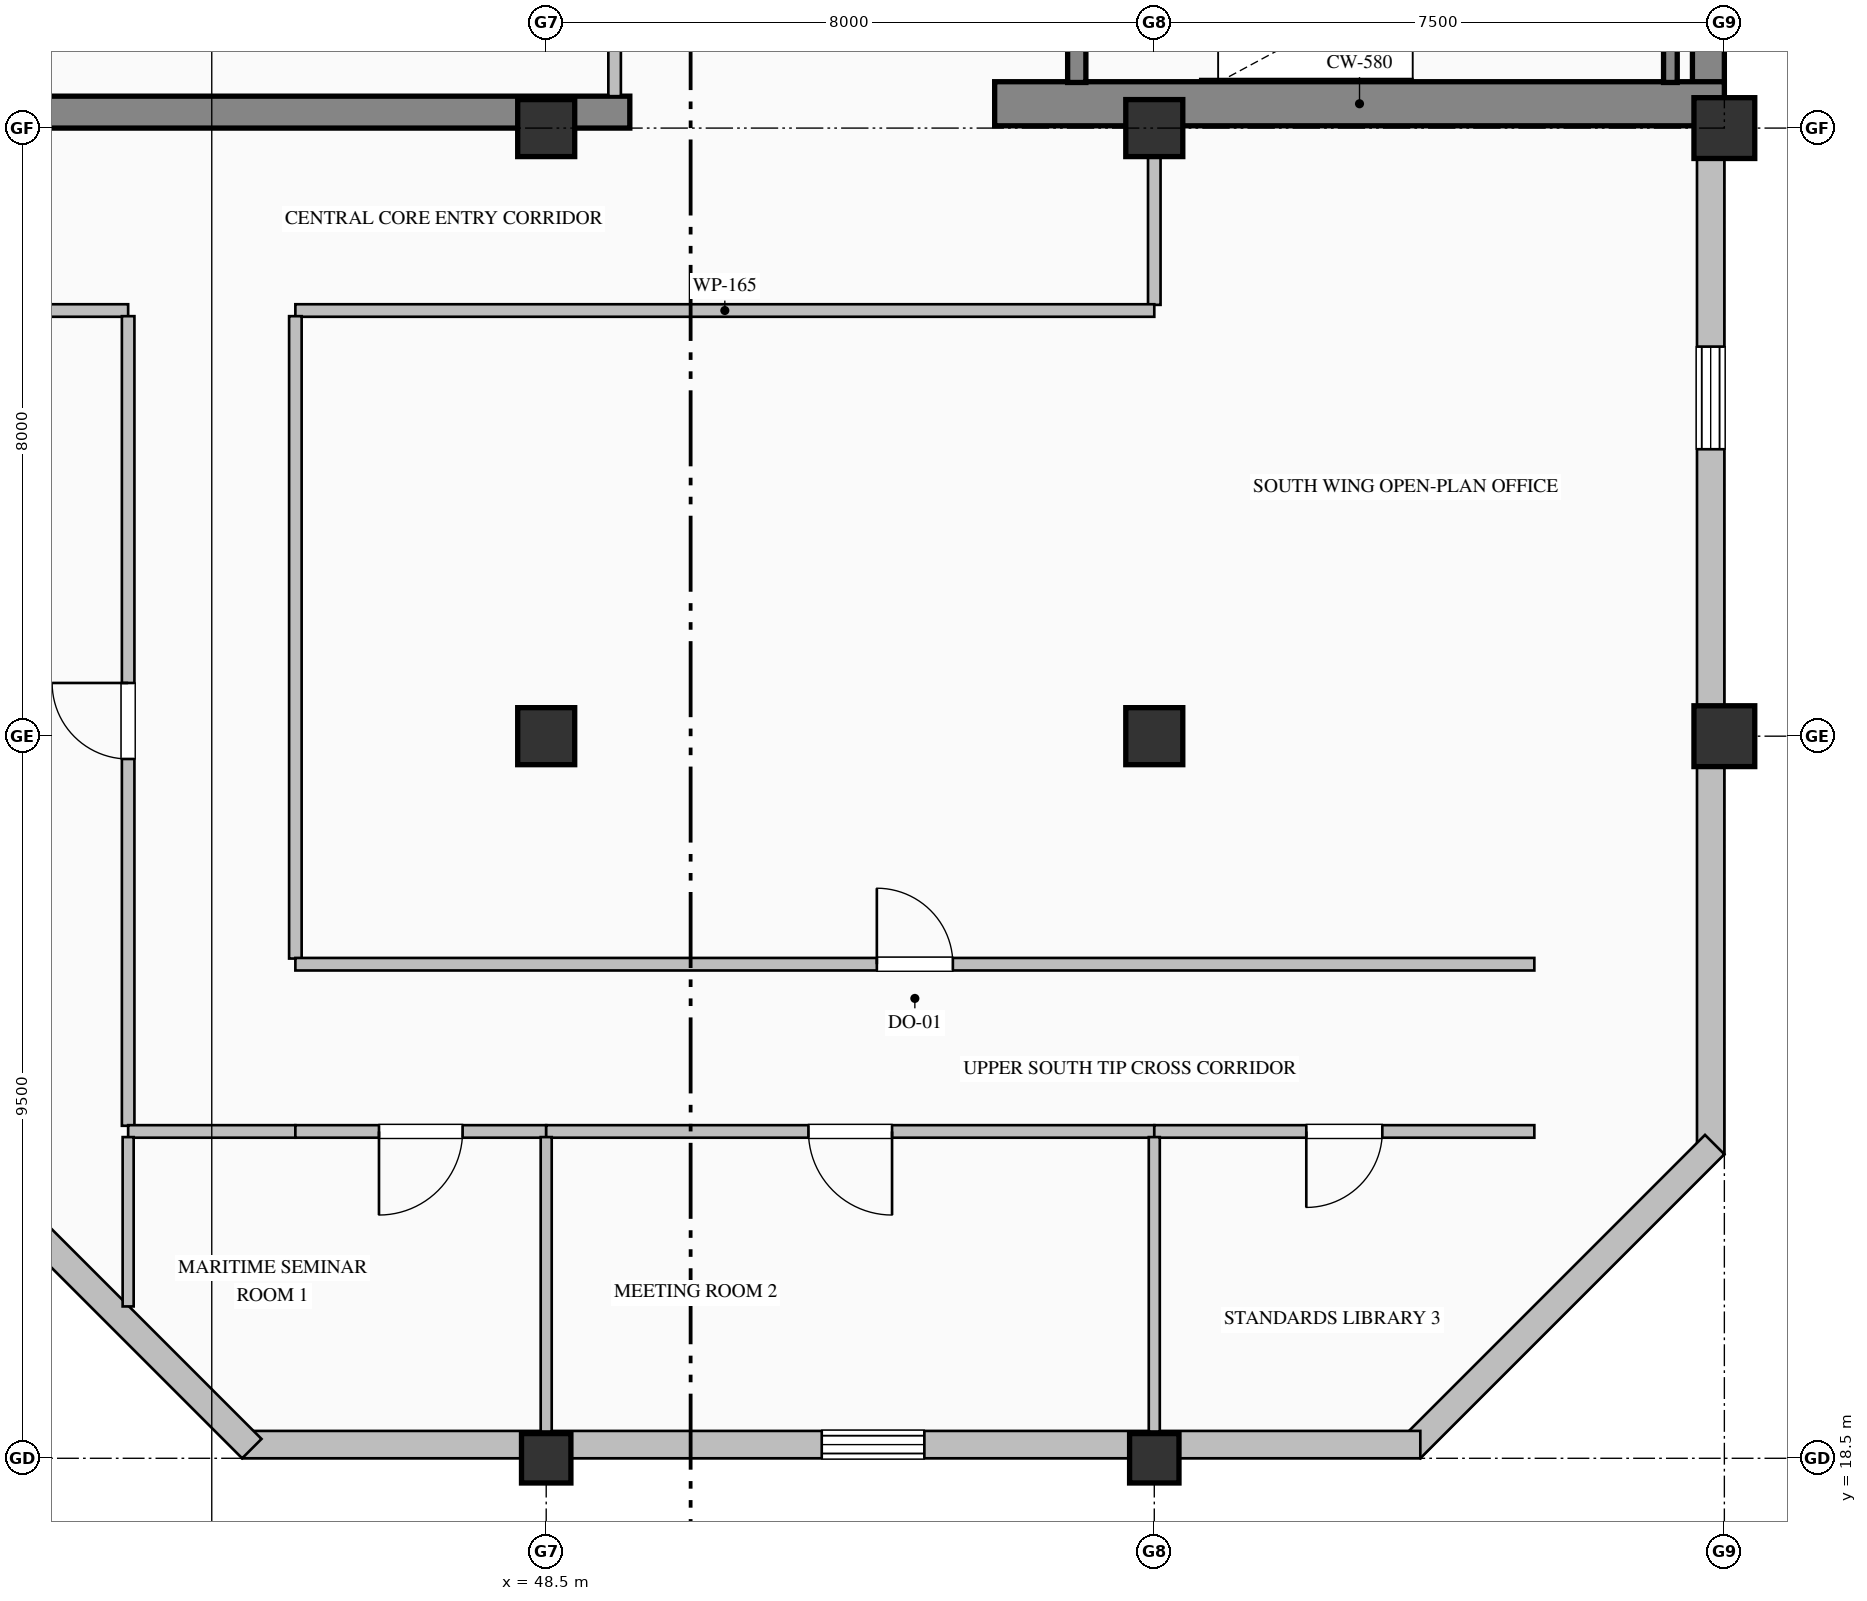
"""IFC4 building model, lengths in metres.
Left out: names, types, materials, properties, quantities, classifications, styles, units other than length and angle.
Written with IfcOpenShell. Run it as: python <this file> out.ifc"""

import sys

from ifc_helpers import new_model, si_unit, direction, frame, frame_2d, origin, origin_2d, place, context, subcontext, project, spatial, rectangle, hollow_rectangle, extrude, element, fill, save


model = new_model("IFC4")
c1 = context("Model", 3, precision=1e-05, world=origin(), true_north=direction((0.0, 1.0)))
c2 = subcontext(c1, "Body", "Model", "MODEL_VIEW")
j1 = project(units=[si_unit("LENGTHUNIT", "METRE"), si_unit("PLANEANGLEUNIT", "RADIAN")], contexts=[c1])
p1 = place(None, origin())
s1 = spatial("IfcSite", under=j1, at=p1, CompositionType="ELEMENT")
p2 = place(p1, origin())
s2 = spatial("IfcBuilding", under=s1, at=p2, CompositionType="ELEMENT")
p3 = place(p2, frame((0.0, 0.0, 307.2)))
s3 = spatial("IfcBuildingStorey", under=s2, at=p3, CompositionType="ELEMENT", Elevation=307.2)
p4 = place(p3, frame((63.79, 36.32, 0.0), z_axis=(0.0, 0.0, 1.0), x_axis=(0.0, 1.0, 0.0)))
e1 = element("IfcWall", 1, at=p4, inside=s3, PredefinedType="SHEAR", context=c2, shape_type="SweptSolid", body=[
    extrude(rectangle(XDim=15.26, YDim=0.42, at=frame_2d((7.63, 0.0))), origin(), (0.0, 0.0, 1.0), 3.785),
])
p5 = place(p3, frame((40.5, 36.21, 0.0), z_axis=(0.0, 0.0, 1.0), x_axis=(1.0, 0.0, 0.0)))
e2 = element("IfcWall", 2, at=p5, inside=s3, PredefinedType="SHEAR", context=c2, shape_type="SweptSolid", body=[
    extrude(rectangle(XDim=9.1, YDim=0.42, at=frame_2d((4.55, 0.0))), origin(), (0.0, 0.0, 1.0), 3.785),
])
p6 = place(p3, frame((54.4, 36.32, 0.0), z_axis=(0.0, 0.0, 1.0), x_axis=(1.0, 0.0, 0.0)))
e3 = element("IfcWall", 3, at=p6, inside=s3, PredefinedType="SHEAR", context=c2, shape_type="SweptSolid", body=[
    extrude(rectangle(XDim=9.6, YDim=0.58, at=frame_2d((4.8, 0.0))), origin(), (0.0, 0.0, 1.0), 4.0),
])
p7 = place(p3, frame((48.5, 18.5, 0.0), z_axis=(0.0, 0.0, 1.0), x_axis=(1.0, 0.0, 0.0)))
e4 = element("IfcColumn", 4, at=p7, inside=s3, PredefinedType="COLUMN", context=c2, shape_type="SweptSolid", body=[
    extrude(hollow_rectangle(XDim=0.65, YDim=0.65, WallThickness=0.028, at=origin_2d()), origin(), (0.0, 0.0, 1.0), 4.0),
])
for number, where, z_axis, x_axis in (
    (5, (48.5, 28.0, 0.0), (0.0, 0.0, 1.0), (1.0, 0.0, 0.0)),
    (6, (48.5, 36.0, 0.0), (0.0, 0.0, 1.0), (1.0, 0.0, 0.0)),
):
    element("IfcColumn", number, at=place(p3, frame(where, z_axis=z_axis, x_axis=x_axis)), inside=s3, PredefinedType="COLUMN", context=c2, shape_type="SweptSolid", body=[
        extrude(rectangle(XDim=0.75, YDim=0.75, at=origin_2d()), origin(), (0.0, 0.0, 1.0), 4.0),
    ])
p8 = place(p3, frame((56.5, 18.5, 0.0), z_axis=(0.0, 0.0, 1.0), x_axis=(1.0, 0.0, 0.0)))
e7 = element("IfcColumn", 7, at=p8, inside=s3, PredefinedType="COLUMN", context=c2, shape_type="SweptSolid", body=[
    extrude(hollow_rectangle(XDim=0.65, YDim=0.65, WallThickness=0.028, at=origin_2d()), origin(), (0.0, 0.0, 1.0), 4.0),
])
for number, where, z_axis, x_axis in (
    (8, (56.5, 28.0, 0.0), (0.0, 0.0, 1.0), (1.0, 0.0, 0.0)),
    (9, (56.5, 36.0, 0.0), (0.0, 0.0, 1.0), (1.0, 0.0, 0.0)),
):
    element("IfcColumn", number, at=place(p3, frame(where, z_axis=z_axis, x_axis=x_axis)), inside=s3, PredefinedType="COLUMN", context=c2, shape_type="SweptSolid", body=[
        extrude(rectangle(XDim=0.75, YDim=0.75, at=origin_2d()), origin(), (0.0, 0.0, 1.0), 4.0),
    ])
for number, where, z_axis, x_axis in (
    (10, (64.0, 28.0, 0.0), (0.0, 0.0, 1.0), (1.0, 0.0, 0.0)),
    (11, (64.0, 36.0, 0.0), (0.0, 0.0, 1.0), (1.0, 0.0, 0.0)),
):
    element("IfcColumn", number, at=place(p3, frame(where, z_axis=z_axis, x_axis=x_axis)), inside=s3, PredefinedType="COLUMN", context=c2, shape_type="SweptSolid", body=[
        extrude(hollow_rectangle(XDim=0.8, YDim=0.8, WallThickness=0.032, at=origin_2d()), origin(), (0.0, 0.0, 1.0), 4.0),
    ])
p9 = place(p3, frame((63.82, 36.05, 0.0), z_axis=(0.0, 0.0, 1.0), x_axis=(0.0, -1.0, 0.0)))
e12 = element("IfcWall", 12, at=p9, inside=s3, PredefinedType="SOLIDWALL", context=c2, shape_type="SweptSolid", body=[
    extrude(rectangle(XDim=13.55, YDim=0.36, at=frame_2d((6.775, 0.0))), origin(), (0.0, 0.0, 1.0), 3.335),
])
p10 = place(p9, frame((2.925, 0.0, 0.9)))
e13 = element("IfcOpeningElement", 13, at=p10, cuts=e12, PredefinedType="OPENING", context=c2, shape_type="SweptSolid", body=[
    extrude(rectangle(XDim=1.35, YDim=1.85, at=frame_2d((0.675, 0.925))), frame((0.0, 0.19, 0.0), z_axis=(0.0, -1.0, 0.0), x_axis=(1.0, 0.0, 0.0)), (0.0, 0.0, 1.0), 0.38),
])
p11 = place(p3, frame((63.873, 22.627, 0.0), z_axis=(0.0, 0.0, 1.0), x_axis=(-0.707106781187, -0.707106781187, 0.0)))
e14 = element("IfcWall", 14, at=p11, inside=s3, PredefinedType="SOLIDWALL", context=c2, shape_type="SweptSolid", body=[
    extrude(rectangle(XDim=5.657, YDim=0.36, at=frame_2d((2.828, 0.0))), origin(), (0.0, 0.0, 1.0), 3.785),
])
p12 = place(p3, frame((60.0, 18.68, 0.0), z_axis=(0.0, 0.0, 1.0), x_axis=(-1.0, 0.0, 0.0)))
e15 = element("IfcWall", 15, at=p12, inside=s3, PredefinedType="SOLIDWALL", context=c2, shape_type="SweptSolid", body=[
    extrude(rectangle(XDim=15.5, YDim=0.36, at=frame_2d((7.75, 0.0))), origin(), (0.0, 0.0, 1.0), 3.335),
])
p13 = place(p12, frame((6.525, 0.0, 0.9)))
e16 = element("IfcOpeningElement", 16, at=p13, cuts=e15, PredefinedType="OPENING", context=c2, shape_type="SweptSolid", body=[
    extrude(rectangle(XDim=1.35, YDim=1.85, at=frame_2d((0.675, 0.925))), frame((0.0, 0.19, 0.0), z_axis=(0.0, -1.0, 0.0), x_axis=(1.0, 0.0, 0.0)), (0.0, 0.0, 1.0), 0.38),
])
p14 = place(p3, frame((44.627, 18.627, 0.0), z_axis=(0.0, 0.0, 1.0), x_axis=(-0.707106781187, 0.707106781187, 0.0)))
e17 = element("IfcWall", 17, at=p14, inside=s3, PredefinedType="SOLIDWALL", context=c2, shape_type="SweptSolid", body=[
    extrude(rectangle(XDim=5.657, YDim=0.36, at=frame_2d((2.828, 0.0))), origin(), (0.0, 0.0, 1.0), 3.785),
])
p15 = place(p3, frame((55.48, 39.75, 0.0), z_axis=(0.0, 0.0, 1.0), x_axis=(0.0, -1.0, 0.0)))
e18 = element("IfcWall", 18, at=p15, inside=s3, PredefinedType="SOLIDWALL", context=c2, shape_type="SweptSolid", body=[
    extrude(rectangle(XDim=3.15, YDim=0.24, at=frame_2d((1.575, 0.0))), origin(), (0.0, 0.0, 1.0), 4.0),
])
p16 = place(p15, frame((1.0, 0.0, 0.0)))
e19 = element("IfcOpeningElement", 19, at=p16, cuts=e18, PredefinedType="OPENING", context=c2, shape_type="SweptSolid", body=[
    extrude(rectangle(XDim=1.15, YDim=2.2, at=frame_2d((0.575, 1.1))), frame((0.0, 0.13, 0.0), z_axis=(0.0, -1.0, 0.0), x_axis=(1.0, 0.0, 0.0)), (0.0, 0.0, 1.0), 0.26),
])
p17 = place(p3, frame((63.29, 36.6, 0.0), z_axis=(0.0, 0.0, 1.0), x_axis=(0.0, 1.0, 0.0)))
e20 = element("IfcWall", 20, at=p17, inside=s3, PredefinedType="SOLIDWALL", context=c2, shape_type="SweptSolid", body=[
    extrude(rectangle(XDim=3.15, YDim=0.18, at=frame_2d((1.575, 0.0))), origin(), (0.0, 0.0, 1.0), 4.0),
])
p18 = place(p3, frame((49.4, 36.42, 0.0), z_axis=(0.0, 0.0, 1.0), x_axis=(0.0, 1.0, 0.0)))
e21 = element("IfcWall", 21, at=p18, inside=s3, PredefinedType="PARTITIONING", context=c2, shape_type="SweptSolid", body=[
    extrude(rectangle(XDim=3.115, YDim=0.165, at=frame_2d((1.558, 0.0))), origin(), (0.0, 0.0, 1.0), 3.027),
])
p19 = place(p18, frame((1.058, 0.0, 0.0)))
e22 = element("IfcOpeningElement", 22, at=p19, cuts=e21, PredefinedType="OPENING", context=c2, shape_type="SweptSolid", body=[
    extrude(rectangle(XDim=1.0, YDim=2.15, at=frame_2d((0.5, 1.075))), frame((0.0, 0.093, 0.0), z_axis=(0.0, -1.0, 0.0), x_axis=(1.0, 0.0, 0.0)), (0.0, 0.0, 1.0), 0.185),
])
p20 = place(p3, frame((56.5, 36.0, 0.0), z_axis=(0.0, 0.0, 1.0), x_axis=(0.0, -1.0, 0.0)))
e23 = element("IfcWall", 23, at=p20, inside=s3, PredefinedType="PARTITIONING", context=c2, shape_type="SweptSolid", body=[
    extrude(rectangle(XDim=2.325, YDim=0.165, at=frame_2d((1.163, 0.0))), origin(), (0.0, 0.0, 1.0), 3.177),
])
p21 = place(p3, frame((56.5, 33.6, 0.0), z_axis=(0.0, 0.0, 1.0), x_axis=(-1.0, 0.0, 0.0)))
e24 = element("IfcWall", 24, at=p21, inside=s3, PredefinedType="PARTITIONING", context=c2, shape_type="SweptSolid", body=[
    extrude(rectangle(XDim=11.3, YDim=0.165, at=frame_2d((5.65, 0.0))), origin(), (0.0, 0.0, 1.0), 3.785),
])
p22 = place(p3, frame((43.0, 33.6, 0.0), z_axis=(0.0, 0.0, 1.0), x_axis=(-1.0, 0.0, 0.0)))
e25 = element("IfcWall", 25, at=p22, inside=s3, PredefinedType="PARTITIONING", context=c2, shape_type="SweptSolid", body=[
    extrude(rectangle(XDim=2.5, YDim=0.165, at=frame_2d((1.25, 0.0))), origin(), (0.0, 0.0, 1.0), 3.785),
])
p23 = place(p3, frame((45.2, 33.525, 0.0), z_axis=(0.0, 0.0, 1.0), x_axis=(0.0, -1.0, 0.0)))
e26 = element("IfcWall", 26, at=p23, inside=s3, PredefinedType="PARTITIONING", context=c2, shape_type="SweptSolid", body=[
    extrude(rectangle(XDim=8.451, YDim=0.165, at=frame_2d((4.226, 0.0))), origin(), (0.0, 0.0, 1.0), 3.785),
])
p24 = place(p3, frame((43.0, 22.875, 0.0), z_axis=(0.0, 0.0, 1.0), x_axis=(0.0, 1.0, 0.0)))
e27 = element("IfcWall", 27, at=p24, inside=s3, PredefinedType="PARTITIONING", context=c2, shape_type="SweptSolid", body=[
    extrude(rectangle(XDim=10.651, YDim=0.165, at=frame_2d((5.325, 0.0))), origin(), (0.0, 0.0, 1.0), 3.785),
])
p25 = place(p24, frame((4.825, 0.0, 0.0)))
e28 = element("IfcOpeningElement", 28, at=p25, cuts=e27, PredefinedType="OPENING", context=c2, shape_type="SweptSolid", body=[
    extrude(rectangle(XDim=1.0, YDim=2.15, at=frame_2d((0.5, 1.075))), frame((0.0, 0.093, 0.0), z_axis=(0.0, -1.0, 0.0), x_axis=(1.0, 0.0, 0.0)), (0.0, 0.0, 1.0), 0.185),
])
p26 = place(p3, frame((45.2, 22.8, 0.0), z_axis=(0.0, 0.0, 1.0), x_axis=(-1.0, 0.0, 0.0)))
e29 = element("IfcWall", 29, at=p26, inside=s3, PredefinedType="PARTITIONING", context=c2, shape_type="SweptSolid", body=[
    extrude(rectangle(XDim=2.2, YDim=0.165, at=frame_2d((1.1, 0.0))), origin(), (0.0, 0.0, 1.0), 3.785),
])
p27 = place(p3, frame((45.2, 25.0, 0.0), z_axis=(0.0, 0.0, 1.0), x_axis=(1.0, 0.0, 0.0)))
e30 = element("IfcWall", 30, at=p27, inside=s3, PredefinedType="PARTITIONING", context=c2, shape_type="SweptSolid", body=[
    extrude(rectangle(XDim=16.3, YDim=0.165, at=frame_2d((8.15, 0.0))), origin(), (0.0, 0.0, 1.0), 3.785),
])
p28 = place(p27, frame((7.65, 0.0, 0.0)))
e31 = element("IfcOpeningElement", 31, at=p28, cuts=e30, PredefinedType="OPENING", context=c2, shape_type="SweptSolid", body=[
    extrude(rectangle(XDim=1.0, YDim=2.15, at=frame_2d((0.5, 1.075))), frame((0.0, 0.093, 0.0), z_axis=(0.0, -1.0, 0.0), x_axis=(1.0, 0.0, 0.0)), (0.0, 0.0, 1.0), 0.185),
])
p29 = place(p3, frame((48.5, 22.8, 0.0), z_axis=(0.0, 0.0, 1.0), x_axis=(-1.0, 0.0, 0.0)))
e32 = element("IfcWall", 32, at=p29, inside=s3, PredefinedType="PARTITIONING", context=c2, shape_type="SweptSolid", body=[
    extrude(rectangle(XDim=3.3, YDim=0.165, at=frame_2d((1.65, 0.0))), origin(), (0.0, 0.0, 1.0), 3.785),
])
p30 = place(p29, frame((1.1, 0.0, 0.0)))
e33 = element("IfcOpeningElement", 33, at=p30, cuts=e32, PredefinedType="OPENING", context=c2, shape_type="SweptSolid", body=[
    extrude(rectangle(XDim=1.1, YDim=2.2, at=frame_2d((0.55, 1.1))), frame((0.0, 0.093, 0.0), z_axis=(0.0, -1.0, 0.0), x_axis=(1.0, 0.0, 0.0)), (0.0, 0.0, 1.0), 0.185),
])
p31 = place(p3, frame((56.5, 22.8, 0.0), z_axis=(0.0, 0.0, 1.0), x_axis=(-1.0, 0.0, 0.0)))
e34 = element("IfcWall", 34, at=p31, inside=s3, PredefinedType="PARTITIONING", context=c2, shape_type="SweptSolid", body=[
    extrude(rectangle(XDim=8.0, YDim=0.165, at=frame_2d((4.0, 0.0))), origin(), (0.0, 0.0, 1.0), 3.785),
])
p32 = place(p31, frame((3.45, 0.0, 0.0)))
e35 = element("IfcOpeningElement", 35, at=p32, cuts=e34, PredefinedType="OPENING", context=c2, shape_type="SweptSolid", body=[
    extrude(rectangle(XDim=1.1, YDim=2.2, at=frame_2d((0.55, 1.1))), frame((0.0, 0.093, 0.0), z_axis=(0.0, -1.0, 0.0), x_axis=(1.0, 0.0, 0.0)), (0.0, 0.0, 1.0), 0.185),
])
p33 = place(p3, frame((61.5, 22.8, 0.0), z_axis=(0.0, 0.0, 1.0), x_axis=(-1.0, 0.0, 0.0)))
e36 = element("IfcWall", 36, at=p33, inside=s3, PredefinedType="PARTITIONING", context=c2, shape_type="SweptSolid", body=[
    extrude(rectangle(XDim=5.0, YDim=0.165, at=frame_2d((2.5, 0.0))), origin(), (0.0, 0.0, 1.0), 3.785),
])
p34 = place(p33, frame((2.0, 0.0, 0.0)))
e37 = element("IfcOpeningElement", 37, at=p34, cuts=e36, PredefinedType="OPENING", context=c2, shape_type="SweptSolid", body=[
    extrude(rectangle(XDim=1.0, YDim=2.15, at=frame_2d((0.5, 1.075))), frame((0.0, 0.093, 0.0), z_axis=(0.0, -1.0, 0.0), x_axis=(1.0, 0.0, 0.0)), (0.0, 0.0, 1.0), 0.185),
])
p35 = place(p3, frame((43.0, 22.726, 0.0), z_axis=(0.0, 0.0, 1.0), x_axis=(0.0, -1.0, 0.0)))
e38 = element("IfcWall", 38, at=p35, inside=s3, PredefinedType="PARTITIONING", context=c2, shape_type="SweptSolid", body=[
    extrude(rectangle(XDim=2.228, YDim=0.145, at=frame_2d((1.114, 0.0))), origin(), (0.0, 0.0, 1.0), 3.785),
])
for number, where, z_axis, x_axis in (
    (39, (48.5, 22.726, 0.0), (0.0, 0.0, 1.0), (0.0, -1.0, 0.0)),
    (40, (56.5, 22.726, 0.0), (0.0, 0.0, 1.0), (0.0, -1.0, 0.0)),
):
    element("IfcWall", number, at=place(p3, frame(where, z_axis=z_axis, x_axis=x_axis)), inside=s3, PredefinedType="PARTITIONING", context=c2, shape_type="SweptSolid", body=[
        extrude(rectangle(XDim=3.874, YDim=0.145, at=frame_2d((1.937, 0.0))), origin(), (0.0, 0.0, 1.0), 2.977),
    ])
p36 = place(p10, origin())
e41 = element("IfcWindow", 41, at=p36, inside=s3, PartitioningType="DOUBLE_PANEL_VERTICAL", PredefinedType="WINDOW", context=c2, shape_type="SweptSolid", body=[
    extrude(rectangle(XDim=1.35, YDim=1.85, at=frame_2d((0.675, 0.925))), frame((0.0, 0.15, 0.0), z_axis=(0.0, -1.0, 0.0), x_axis=(1.0, 0.0, 0.0)), (0.0, 0.0, 1.0), 0.06),
])
fill(e13, e41)
p37 = place(p13, origin())
e42 = element("IfcWindow", 42, at=p37, inside=s3, PartitioningType="DOUBLE_PANEL_VERTICAL", PredefinedType="WINDOW", context=c2, shape_type="SweptSolid", body=[
    extrude(rectangle(XDim=1.35, YDim=1.85, at=frame_2d((0.675, 0.925))), frame((0.0, 0.15, 0.0), z_axis=(0.0, -1.0, 0.0), x_axis=(1.0, 0.0, 0.0)), (0.0, 0.0, 1.0), 0.06),
])
fill(e16, e42)
p38 = place(p28, origin())
e43 = element("IfcDoor", 43, at=p38, inside=s3, OperationType="SINGLE_SWING_LEFT", PredefinedType="DOOR", context=c2, shape_type="SweptSolid", body=[
    extrude(rectangle(XDim=1.0, YDim=2.15, at=frame_2d((0.5, 1.075))), frame((0.0, 0.025, 0.0), z_axis=(0.0, -1.0, 0.0), x_axis=(1.0, 0.0, 0.0)), (0.0, 0.0, 1.0), 0.05),
])
fill(e31, e43)
p39 = place(p25, origin())
e44 = element("IfcDoor", 44, at=p39, inside=s3, OperationType="SINGLE_SWING_RIGHT", PredefinedType="DOOR", context=c2, shape_type="SweptSolid", body=[
    extrude(rectangle(XDim=1.0, YDim=2.15, at=frame_2d((0.5, 1.075))), frame((0.0, 0.025, 0.0), z_axis=(0.0, -1.0, 0.0), x_axis=(1.0, 0.0, 0.0)), (0.0, 0.0, 1.0), 0.05),
])
fill(e28, e44)
p40 = place(p30, origin())
e45 = element("IfcDoor", 45, at=p40, inside=s3, OperationType="SINGLE_SWING_RIGHT", PredefinedType="DOOR", context=c2, shape_type="SweptSolid", body=[
    extrude(rectangle(XDim=1.1, YDim=2.2, at=frame_2d((0.55, 1.1))), frame((0.0, 0.025, 0.0), z_axis=(0.0, -1.0, 0.0), x_axis=(1.0, 0.0, 0.0)), (0.0, 0.0, 1.0), 0.05),
])
fill(e33, e45)
p41 = place(p32, origin())
e46 = element("IfcDoor", 46, at=p41, inside=s3, OperationType="SINGLE_SWING_LEFT", PredefinedType="DOOR", context=c2, shape_type="SweptSolid", body=[
    extrude(rectangle(XDim=1.1, YDim=2.2, at=frame_2d((0.55, 1.1))), frame((0.0, 0.025, 0.0), z_axis=(0.0, -1.0, 0.0), x_axis=(1.0, 0.0, 0.0)), (0.0, 0.0, 1.0), 0.05),
])
fill(e35, e46)
p42 = place(p34, origin())
e47 = element("IfcDoor", 47, at=p42, inside=s3, OperationType="SINGLE_SWING_RIGHT", PredefinedType="DOOR", context=c2, shape_type="SweptSolid", body=[
    extrude(rectangle(XDim=1.0, YDim=2.15, at=frame_2d((0.5, 1.075))), frame((0.0, 0.025, 0.0), z_axis=(0.0, -1.0, 0.0), x_axis=(1.0, 0.0, 0.0)), (0.0, 0.0, 1.0), 0.05),
])
fill(e37, e47)
save(model, sys.argv[1])
